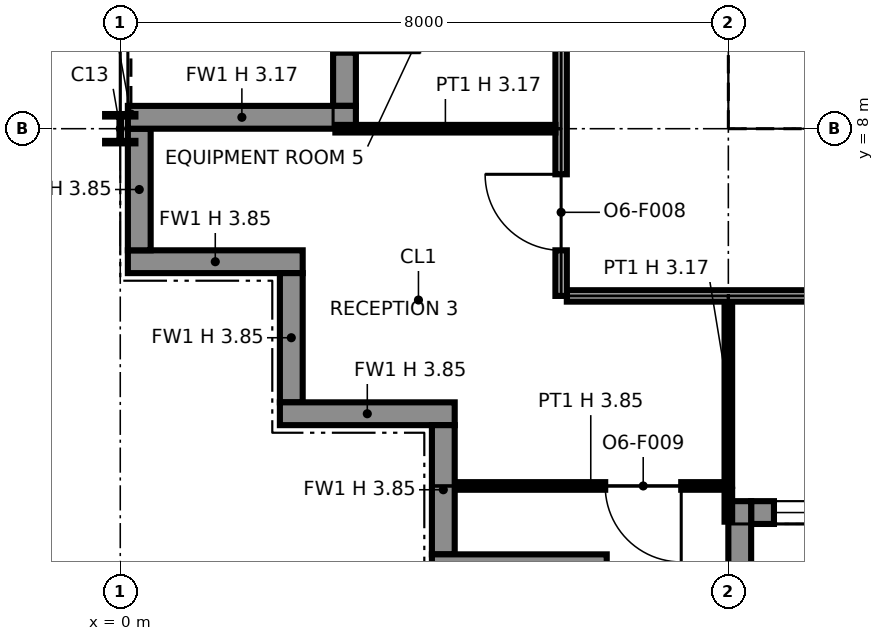
"""IFC4 building model, lengths in metres.
Left out: names, types, materials, properties, quantities, classifications, styles, units other than length and angle.
Written with IfcOpenShell. Run it as: python <this file> out.ifc"""

import sys

from ifc_helpers import new_model, si_unit, direction, frame, frame_2d, origin, origin_2d, place, context, subcontext, project, spatial, polyline, rectangle, i_section, outline, extrude, element, fill, save


model = new_model("IFC4")
c1 = context("Model", 3, precision=1e-05, world=origin(), true_north=direction((0.0, 1.0)))
c2 = subcontext(c1, "Body", "Model", "MODEL_VIEW")
j1 = project(units=[si_unit("LENGTHUNIT", "METRE"), si_unit("PLANEANGLEUNIT", "RADIAN")], contexts=[c1])
p1 = place(None, origin())
s1 = spatial("IfcSite", under=j1, at=p1, CompositionType="ELEMENT")
p2 = place(p1, origin())
s2 = spatial("IfcBuilding", under=s1, at=p2, CompositionType="ELEMENT")
p3 = place(p2, frame((0.0, 0.0, 233.0)))
s3 = spatial("IfcBuildingStorey", under=s2, at=p3, CompositionType="ELEMENT", Elevation=233.0)
p4 = place(p3, frame((0.0, 8.0, 0.0), z_axis=(0.0, 0.0, 1.0), x_axis=(1.0, 0.0, 0.0)))
e1 = element("IfcColumn", 1, at=p4, inside=s3, PredefinedType="COLUMN", context=c2, shape_type="SweptSolid", body=[
    extrude(i_section(OverallWidth=0.399, OverallDepth=0.386, WebThickness=0.021, FlangeThickness=0.033, at=origin_2d()), origin(), (0.0, 0.0, 1.0), 3.85),
])
p5 = place(p3, frame((8.0, 8.0, 0.0), z_axis=(0.0, 0.0, 1.0), x_axis=(1.0, 0.0, 0.0)))
e2 = element("IfcColumn", 2, at=p5, inside=s3, PredefinedType="COLUMN", context=c2, shape_type="SweptSolid", body=[
    extrude(i_section(OverallWidth=0.373, OverallDepth=0.368, WebThickness=0.015, FlangeThickness=0.024, at=origin_2d()), origin(), (0.0, 0.0, 1.0), 3.85),
])
p6 = place(p3, frame((0.1, 6.25, 0.0), z_axis=(0.0, 0.0, 1.0), x_axis=(1.0, 0.0, 0.0)))
e3 = element("IfcWall", 3, at=p6, inside=s3, PredefinedType="SOLIDWALL", context=c2, shape_type="SweptSolid", body=[
    extrude(rectangle(XDim=2.3, YDim=0.3, at=frame_2d((1.15, 0.0))), origin(), (0.0, 0.0, 1.0), 3.85),
])
p7 = place(p3, frame((2.25, 6.1, 0.0), z_axis=(0.0, 0.0, 1.0), x_axis=(0.0, -1.0, 0.0)))
e4 = element("IfcWall", 4, at=p7, inside=s3, PredefinedType="SOLIDWALL", context=c2, shape_type="SweptSolid", body=[
    extrude(rectangle(XDim=1.7, YDim=0.3, at=frame_2d((0.85, 0.0))), origin(), (0.0, 0.0, 1.0), 3.85),
])
p8 = place(p3, frame((2.1, 4.25, 0.0), z_axis=(0.0, 0.0, 1.0), x_axis=(1.0, 0.0, 0.0)))
e5 = element("IfcWall", 5, at=p8, inside=s3, PredefinedType="SOLIDWALL", context=c2, shape_type="SweptSolid", body=[
    extrude(rectangle(XDim=2.3, YDim=0.3, at=frame_2d((1.15, 0.0))), origin(), (0.0, 0.0, 1.0), 3.85),
])
p9 = place(p3, frame((4.25, 4.1, 0.0), z_axis=(0.0, 0.0, 1.0), x_axis=(0.0, -1.0, 0.0)))
e6 = element("IfcWall", 6, at=p9, inside=s3, PredefinedType="SOLIDWALL", context=c2, shape_type="SweptSolid", body=[
    extrude(rectangle(XDim=1.7, YDim=0.3, at=frame_2d((0.85, 0.0))), origin(), (0.0, 0.0, 1.0), 3.85),
])
p10 = place(p3, frame((4.1, 2.25, 0.0), z_axis=(0.0, 0.0, 1.0), x_axis=(1.0, 0.0, 0.0)))
e7 = element("IfcWall", 7, at=p10, inside=s3, PredefinedType="SOLIDWALL", context=c2, shape_type="SweptSolid", body=[
    extrude(rectangle(XDim=2.3, YDim=0.3, at=frame_2d((1.15, 0.0))), origin(), (0.0, 0.0, 1.0), 3.85),
])
p11 = place(p3, frame((8.3, 2.95, 0.0), z_axis=(0.0, 0.0, 1.0), x_axis=(1.0, 0.0, 0.0)))
e8 = element("IfcWall", 8, at=p11, inside=s3, PredefinedType="SOLIDWALL", context=c2, shape_type="SweptSolid", body=[
    extrude(rectangle(XDim=7.4, YDim=0.3, at=frame_2d((3.7, 0.0))), origin(), (0.0, 0.0, 1.0), 3.85),
])
p12 = place(p11, frame((0.3, 0.0, 0.9)))
e9 = element("IfcOpeningElement", 9, at=p12, cuts=e8, PredefinedType="OPENING", context=c2, shape_type="SweptSolid", body=[
    extrude(rectangle(XDim=2.8, YDim=2.2, at=frame_2d((1.4, 1.1))), frame((0.0, 0.16, 0.0), z_axis=(0.0, -1.0, 0.0), x_axis=(1.0, 0.0, 0.0)), (0.0, 0.0, 1.0), 0.32),
])
p13 = place(p11, frame((4.7, 0.0, 0.0)))
e10 = element("IfcOpeningElement", 10, at=p13, cuts=e8, PredefinedType="OPENING", context=c2, shape_type="SweptSolid", body=[
    extrude(rectangle(XDim=2.0, YDim=2.4, at=frame_2d((1.0, 1.2))), frame((0.0, 0.16, 0.0), z_axis=(0.0, -1.0, 0.0), x_axis=(1.0, 0.0, 0.0)), (0.0, 0.0, 1.0), 0.32),
])
p14 = place(p3, frame((8.15, 0.1, 0.0), z_axis=(0.0, 0.0, 1.0), x_axis=(0.0, 1.0, 0.0)))
e11 = element("IfcWall", 11, at=p14, inside=s3, PredefinedType="SOLIDWALL", context=c2, shape_type="SweptSolid", body=[
    extrude(rectangle(XDim=3.0, YDim=0.3, at=frame_2d((1.5, 0.0))), origin(), (0.0, 0.0, 1.0), 3.171),
])
p15 = place(p3, frame((2.95, 15.7, 0.0), z_axis=(0.0, 0.0, 1.0), x_axis=(0.0, -1.0, 0.0)))
e12 = element("IfcWall", 12, at=p15, inside=s3, PredefinedType="SOLIDWALL", context=c2, shape_type="SweptSolid", body=[
    extrude(rectangle(XDim=7.4, YDim=0.3, at=frame_2d((3.7, 0.0))), origin(), (0.0, 0.0, 1.0), 3.85),
])
p16 = place(p15, frame((0.3, 0.0, 0.9)))
e13 = element("IfcOpeningElement", 13, at=p16, cuts=e12, PredefinedType="OPENING", context=c2, shape_type="SweptSolid", body=[
    extrude(rectangle(XDim=2.8, YDim=2.2, at=frame_2d((1.4, 1.1))), frame((0.0, 0.16, 0.0), z_axis=(0.0, -1.0, 0.0), x_axis=(1.0, 0.0, 0.0)), (0.0, 0.0, 1.0), 0.32),
])
p17 = place(p15, frame((4.7, 0.0, 0.0)))
e14 = element("IfcOpeningElement", 14, at=p17, cuts=e12, PredefinedType="OPENING", context=c2, shape_type="SweptSolid", body=[
    extrude(rectangle(XDim=2.0, YDim=2.4, at=frame_2d((1.0, 1.2))), frame((0.0, 0.16, 0.0), z_axis=(0.0, -1.0, 0.0), x_axis=(1.0, 0.0, 0.0)), (0.0, 0.0, 1.0), 0.32),
])
p18 = place(p3, frame((0.1, 8.15, 0.0), z_axis=(0.0, 0.0, 1.0), x_axis=(1.0, 0.0, 0.0)))
e15 = element("IfcWall", 15, at=p18, inside=s3, PredefinedType="SOLIDWALL", context=c2, shape_type="SweptSolid", body=[
    extrude(rectangle(XDim=3.0, YDim=0.3, at=frame_2d((1.5, 0.0))), origin(), (0.0, 0.0, 1.0), 3.171),
])
p19 = place(p3, frame((0.25, 8.0, 0.0), z_axis=(0.0, 0.0, 1.0), x_axis=(0.0, -1.0, 0.0)))
e16 = element("IfcWall", 16, at=p19, inside=s3, PredefinedType="SOLIDWALL", context=c2, shape_type="SweptSolid", body=[
    extrude(rectangle(XDim=1.6, YDim=0.3, at=frame_2d((0.8, 0.0))), origin(), (0.0, 0.0, 1.0), 3.85),
])
p20 = place(p3, frame((8.65, 8.75, 0.0), z_axis=(0.0, 0.0, 1.0), x_axis=(1.0, 0.0, 0.0)))
e17 = element("IfcWall", 17, at=p20, inside=s3, PredefinedType="PARTITIONING", context=c2, shape_type="SweptSolid", body=[
    extrude(outline(polyline([(0.0, 0.0), (14.7, 0.0), (14.7, 3.85), (7.438, 3.85), (7.438, 3.308), (7.262, 3.308), (7.261, 3.85), (0.0, 3.85), (0.0, 0.0)])), frame((0.0, 0.1, 0.0), z_axis=(0.0, -1.0, 0.0), x_axis=(1.0, 0.0, 0.0)), (0.0, 0.0, 1.0), 0.2),
])
p21 = place(p20, frame((1.3, 0.0, 0.0)))
e18 = element("IfcOpeningElement", 18, at=p21, cuts=e17, PredefinedType="OPENING", context=c2, shape_type="SweptSolid", body=[
    extrude(rectangle(XDim=1.4, YDim=2.1, at=frame_2d((0.7, 1.05))), frame((0.0, 0.11, 0.0), z_axis=(0.0, -1.0, 0.0), x_axis=(1.0, 0.0, 0.0)), (0.0, 0.0, 1.0), 0.22),
])
p22 = place(p20, frame((4.6, 0.0, 0.0)))
e19 = element("IfcOpeningElement", 19, at=p22, cuts=e17, PredefinedType="OPENING", context=c2, shape_type="SweptSolid", body=[
    extrude(rectangle(XDim=1.4, YDim=2.1, at=frame_2d((0.7, 1.05))), frame((0.0, 0.11, 0.0), z_axis=(0.0, -1.0, 0.0), x_axis=(1.0, 0.0, 0.0)), (0.0, 0.0, 1.0), 0.22),
])
p23 = place(p20, frame((10.4, 0.0, 0.0)))
e20 = element("IfcOpeningElement", 20, at=p23, cuts=e17, PredefinedType="OPENING", context=c2, shape_type="SweptSolid", body=[
    extrude(rectangle(XDim=1.2, YDim=2.1, at=frame_2d((0.6, 1.05))), frame((0.0, 0.11, 0.0), z_axis=(0.0, -1.0, 0.0), x_axis=(1.0, 0.0, 0.0)), (0.0, 0.0, 1.0), 0.22),
])
p24 = place(p3, frame((8.75, 8.85, 0.0), z_axis=(0.0, 0.0, 1.0), x_axis=(0.0, 1.0, 0.0)))
e21 = element("IfcWall", 21, at=p24, inside=s3, PredefinedType="PARTITIONING", context=c2, shape_type="SweptSolid", body=[
    extrude(outline(polyline([(0.0, 0.0), (14.3, 0.0), (14.3, 3.85), (10.225, 3.85), (10.224, 3.44), (10.076, 3.44), (10.075, 3.85), (7.239, 3.85), (7.238, 3.308), (7.062, 3.308), (7.062, 3.85), (0.0, 3.85), (0.0, 0.0)])), frame((0.0, 0.1, 0.0), z_axis=(0.0, -1.0, 0.0), x_axis=(1.0, 0.0, 0.0)), (0.0, 0.0, 1.0), 0.2),
])
p25 = place(p24, frame((8.3, 0.0, 0.0)))
e22 = element("IfcOpeningElement", 22, at=p25, cuts=e21, PredefinedType="OPENING", context=c2, shape_type="SweptSolid", body=[
    extrude(rectangle(XDim=1.8, YDim=2.1, at=frame_2d((0.9, 1.05))), frame((0.0, 0.11, 0.0), z_axis=(0.0, -1.0, 0.0), x_axis=(1.0, 0.0, 0.0)), (0.0, 0.0, 1.0), 0.22),
])
p26 = place(p3, frame((8.0, 2.83, 0.0), z_axis=(0.0, 0.0, 1.0), x_axis=(0.0, 1.0, 0.0)))
e23 = element("IfcWall", 23, at=p26, inside=s3, PredefinedType="PARTITIONING", context=c2, shape_type="SweptSolid", body=[
    extrude(rectangle(XDim=0.42, YDim=0.1, at=frame_2d((0.21, 0.0))), origin(), (0.0, 0.0, 1.0), 3.172),
])
p27 = place(p3, frame((4.43, 3.3, 0.0), z_axis=(0.0, 0.0, 1.0), x_axis=(1.0, 0.0, 0.0)))
e24 = element("IfcWall", 24, at=p27, inside=s3, PredefinedType="PARTITIONING", context=c2, shape_type="SweptSolid", body=[
    extrude(rectangle(XDim=3.52, YDim=0.1, at=frame_2d((1.76, 0.0))), origin(), (0.0, 0.0, 1.0), 3.85),
])
p28 = place(p27, frame((2.95, 0.0, 0.0), z_axis=(0.0, 0.0, 1.0), x_axis=(-1.0, 0.0, 0.0)))
e25 = element("IfcOpeningElement", 25, at=p28, cuts=e24, PredefinedType="OPENING", context=c2, shape_type="SweptSolid", body=[
    extrude(rectangle(XDim=1.0, YDim=2.1, at=frame_2d((0.5, 1.05))), frame((0.0, 0.06, 0.0), z_axis=(0.0, -1.0, 0.0), x_axis=(1.0, 0.0, 0.0)), (0.0, 0.0, 1.0), 0.12),
])
p29 = place(p3, frame((8.0, 3.3, 0.0), z_axis=(0.0, 0.0, 1.0), x_axis=(0.0, 1.0, 0.0)))
e26 = element("IfcWall", 26, at=p29, inside=s3, PredefinedType="PARTITIONING", context=c2, shape_type="SweptSolid", body=[
    extrude(rectangle(XDim=2.425, YDim=0.1, at=frame_2d((1.212, 0.0))), origin(), (0.0, 0.0, 1.0), 3.172),
])
p30 = place(p3, frame((5.875, 5.8, 0.0), z_axis=(0.0, 0.0, 1.0), x_axis=(1.0, 0.0, 0.0)))
e27 = element("IfcWall", 27, at=p30, inside=s3, PredefinedType="PARTITIONING", context=c2, shape_type="SweptSolid", body=[
    extrude(rectangle(XDim=36.25, YDim=0.15, at=frame_2d((18.125, 0.0))), origin(), (0.0, 0.0, 1.0), 3.85),
])
p31 = place(p30, frame((11.625, 0.0, 0.0)))
e28 = element("IfcOpeningElement", 28, at=p31, cuts=e27, PredefinedType="OPENING", context=c2, shape_type="SweptSolid", body=[
    extrude(rectangle(XDim=1.0, YDim=2.1, at=frame_2d((0.5, 1.05))), frame((0.0, 0.085, 0.0), z_axis=(0.0, -1.0, 0.0), x_axis=(1.0, 0.0, 0.0)), (0.0, 0.0, 1.0), 0.17),
])
p32 = place(p30, frame((16.625, 0.0, 0.0), z_axis=(0.0, 0.0, 1.0), x_axis=(-1.0, 0.0, 0.0)))
e29 = element("IfcOpeningElement", 29, at=p32, cuts=e27, PredefinedType="OPENING", context=c2, shape_type="SweptSolid", body=[
    extrude(rectangle(XDim=1.0, YDim=2.1, at=frame_2d((0.5, 1.05))), frame((0.0, 0.085, 0.0), z_axis=(0.0, -1.0, 0.0), x_axis=(1.0, 0.0, 0.0)), (0.0, 0.0, 1.0), 0.17),
])
p33 = place(p30, frame((29.625, 0.0, 0.0)))
e30 = element("IfcOpeningElement", 30, at=p33, cuts=e27, PredefinedType="OPENING", context=c2, shape_type="SweptSolid", body=[
    extrude(rectangle(XDim=1.0, YDim=2.1, at=frame_2d((0.5, 1.05))), frame((0.0, 0.085, 0.0), z_axis=(0.0, -1.0, 0.0), x_axis=(1.0, 0.0, 0.0)), (0.0, 0.0, 1.0), 0.17),
])
p34 = place(p30, frame((4.625, 0.0, 0.0), z_axis=(0.0, 0.0, 1.0), x_axis=(-1.0, 0.0, 0.0)))
e31 = element("IfcOpeningElement", 31, at=p34, cuts=e27, PredefinedType="OPENING", context=c2, shape_type="SweptSolid", body=[
    extrude(rectangle(XDim=1.0, YDim=2.1, at=frame_2d((0.5, 1.05))), frame((0.0, 0.085, 0.0), z_axis=(0.0, -1.0, 0.0), x_axis=(1.0, 0.0, 0.0)), (0.0, 0.0, 1.0), 0.17),
])
p35 = place(p30, frame((8.625, 0.0, 0.0), z_axis=(0.0, 0.0, 1.0), x_axis=(-1.0, 0.0, 0.0)))
e32 = element("IfcOpeningElement", 32, at=p35, cuts=e27, PredefinedType="OPENING", context=c2, shape_type="SweptSolid", body=[
    extrude(rectangle(XDim=1.0, YDim=2.1, at=frame_2d((0.5, 1.05))), frame((0.0, 0.085, 0.0), z_axis=(0.0, -1.0, 0.0), x_axis=(1.0, 0.0, 0.0)), (0.0, 0.0, 1.0), 0.17),
])
p36 = place(p30, frame((22.725, 0.0, 0.0)))
e33 = element("IfcOpeningElement", 33, at=p36, cuts=e27, PredefinedType="OPENING", context=c2, shape_type="SweptSolid", body=[
    extrude(rectangle(XDim=1.0, YDim=2.1, at=frame_2d((0.5, 1.05))), frame((0.0, 0.085, 0.0), z_axis=(0.0, -1.0, 0.0), x_axis=(1.0, 0.0, 0.0)), (0.0, 0.0, 1.0), 0.17),
])
p37 = place(p3, frame((5.8, 5.8, 0.0), z_axis=(0.0, 0.0, 1.0), x_axis=(0.0, 1.0, 0.0)))
e34 = element("IfcWall", 34, at=p37, inside=s3, PredefinedType="PARTITIONING", context=c2, shape_type="SweptSolid", body=[
    extrude(outline(polyline([(0.0, 0.0), (13.575, 0.0), (13.575, 3.85), (10.5, 3.85), (10.498, 3.172), (9.902, 3.172), (9.9, 3.85), (6.5, 3.85), (6.498, 3.172), (5.902, 3.172), (5.9, 3.85), (2.5, 3.85), (2.498, 3.172), (1.902, 3.172), (1.9, 3.85), (0.0, 3.85), (0.0, 0.0)])), frame((0.0, 0.075, 0.0), z_axis=(0.0, -1.0, 0.0), x_axis=(1.0, 0.0, 0.0)), (0.0, 0.0, 1.0), 0.15),
])
p38 = place(p37, frame((0.6, 0.0, 0.0)))
e35 = element("IfcOpeningElement", 35, at=p38, cuts=e34, PredefinedType="OPENING", context=c2, shape_type="SweptSolid", body=[
    extrude(rectangle(XDim=1.0, YDim=2.1, at=frame_2d((0.5, 1.05))), frame((0.0, 0.085, 0.0), z_axis=(0.0, -1.0, 0.0), x_axis=(1.0, 0.0, 0.0)), (0.0, 0.0, 1.0), 0.17),
])
p39 = place(p37, frame((3.7, 0.0, 0.0)))
e36 = element("IfcOpeningElement", 36, at=p39, cuts=e34, PredefinedType="OPENING", context=c2, shape_type="SweptSolid", body=[
    extrude(rectangle(XDim=1.0, YDim=2.1, at=frame_2d((0.5, 1.05))), frame((0.0, 0.085, 0.0), z_axis=(0.0, -1.0, 0.0), x_axis=(1.0, 0.0, 0.0)), (0.0, 0.0, 1.0), 0.17),
])
p40 = place(p37, frame((7.7, 0.0, 0.0)))
e37 = element("IfcOpeningElement", 37, at=p40, cuts=e34, PredefinedType="OPENING", context=c2, shape_type="SweptSolid", body=[
    extrude(rectangle(XDim=1.0, YDim=2.1, at=frame_2d((0.5, 1.05))), frame((0.0, 0.085, 0.0), z_axis=(0.0, -1.0, 0.0), x_axis=(1.0, 0.0, 0.0)), (0.0, 0.0, 1.0), 0.17),
])
p41 = place(p37, frame((11.425, 0.0, 0.0)))
e38 = element("IfcOpeningElement", 38, at=p41, cuts=e34, PredefinedType="OPENING", context=c2, shape_type="SweptSolid", body=[
    extrude(rectangle(XDim=1.0, YDim=2.1, at=frame_2d((0.5, 1.05))), frame((0.0, 0.085, 0.0), z_axis=(0.0, -1.0, 0.0), x_axis=(1.0, 0.0, 0.0)), (0.0, 0.0, 1.0), 0.17),
])
p42 = place(p3, frame((2.83, 8.0, 0.0), z_axis=(0.0, 0.0, 1.0), x_axis=(1.0, 0.0, 0.0)))
e39 = element("IfcWall", 39, at=p42, inside=s3, PredefinedType="PARTITIONING", context=c2, shape_type="SweptSolid", body=[
    extrude(rectangle(XDim=2.895, YDim=0.1, at=frame_2d((1.448, 0.0))), origin(), (0.0, 0.0, 1.0), 3.172),
])
p43 = place(p12, origin())
e40 = element("IfcWindow", 40, at=p43, inside=s3, PartitioningType="SINGLE_PANEL", PredefinedType="WINDOW", context=c2, shape_type="SweptSolid", body=[
    extrude(rectangle(XDim=2.8, YDim=2.2, at=frame_2d((1.4, 1.1))), frame((0.0, 0.03, 0.0), z_axis=(0.0, -1.0, 0.0), x_axis=(1.0, 0.0, 0.0)), (0.0, 0.0, 1.0), 0.06),
])
fill(e9, e40)
p44 = place(p38, origin())
e41 = element("IfcDoor", 41, at=p44, inside=s3, OperationType="SINGLE_SWING_RIGHT", PredefinedType="DOOR", context=c2, shape_type="SweptSolid", body=[
    extrude(rectangle(XDim=1.0, YDim=2.1, at=frame_2d((0.5, 1.05))), frame((0.0, 0.025, 0.0), z_axis=(0.0, -1.0, 0.0), x_axis=(1.0, 0.0, 0.0)), (0.0, 0.0, 1.0), 0.05),
])
fill(e35, e41)
p45 = place(p28, origin())
e42 = element("IfcDoor", 42, at=p45, inside=s3, OperationType="SINGLE_SWING_LEFT", PredefinedType="DOOR", context=c2, shape_type="SweptSolid", body=[
    extrude(rectangle(XDim=1.0, YDim=2.1, at=frame_2d((0.5, 1.05))), frame((0.0, 0.025, 0.0), z_axis=(0.0, -1.0, 0.0), x_axis=(1.0, 0.0, 0.0)), (0.0, 0.0, 1.0), 0.05),
])
fill(e25, e42)
save(model, sys.argv[1])
